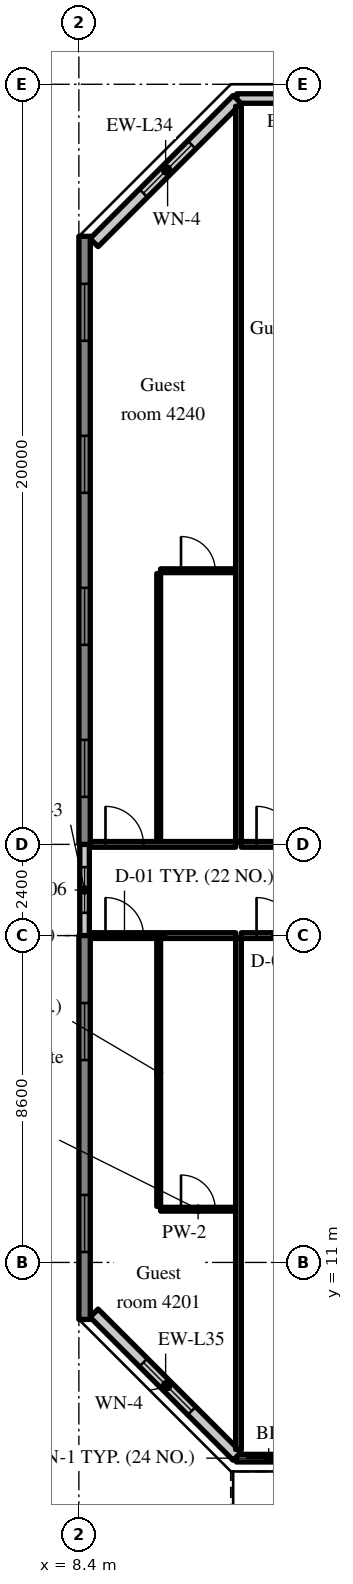
"""IFC4 building model, lengths in metres.
Left out: names, types, materials, properties, quantities, classifications, styles, units other than length and angle.
Written with IfcOpenShell. Run it as: python <this file> out.ifc"""

import sys

from ifc_helpers import new_model, si_unit, direction, frame, frame_2d, origin, place, context, subcontext, project, spatial, rectangle, extrude, source, transform, mapped, element, fill, save


model = new_model("IFC4")
c1 = context("Model", 3, precision=1e-05, world=origin(), true_north=direction((0.0, 1.0)))
c2 = subcontext(c1, "Body", "Model", "MODEL_VIEW")
j1 = project(units=[si_unit("LENGTHUNIT", "METRE"), si_unit("PLANEANGLEUNIT", "RADIAN")], contexts=[c1])
p1 = place(None, origin())
s1 = spatial("IfcSite", under=j1, at=p1, CompositionType="ELEMENT")
p2 = place(p1, origin())
s2 = spatial("IfcBuilding", under=s1, at=p2, CompositionType="ELEMENT")
p3 = place(p2, frame((0.0, 0.0, 174.4)))
s3 = spatial("IfcBuildingStorey", under=s2, at=p3, CompositionType="ELEMENT", Elevation=174.4)
m1 = source(origin(), c2, "Body", "SweptSolid", [
    extrude(rectangle(XDim=10.1, YDim=0.3, at=frame_2d((5.05, 0.0))), origin(), (0.0, 0.0, 1.0), 3.52),
])
p4 = place(p3, frame((8.55, 9.5, 0.0), z_axis=(0.0, 0.0, 1.0), x_axis=(0.0, 1.0, 0.0)))
e1 = element("IfcWall", 1, at=p4, inside=s3, PredefinedType="SHEAR", context=c2, shape_type="MappedRepresentation", body=[
    mapped(m1, transform((0.0, 0.0, 0.0), scale=1.0)),
])
m2 = source(origin(), c2, "Body", "SweptSolid", [
    extrude(rectangle(XDim=1.5, YDim=1.5, at=frame_2d((0.75, 0.75))), frame((0.0, 0.16, 0.0), z_axis=(0.0, -1.0, 0.0), x_axis=(1.0, 0.0, 0.0)), (0.0, 0.0, 1.0), 0.32),
])
p5 = place(p4, frame((1.775, 0.0, 0.9)))
e2 = element("IfcOpeningElement", 2, at=p5, cuts=e1, PredefinedType="OPENING", context=c2, shape_type="MappedRepresentation", body=[
    mapped(m2, transform((0.0, 0.0, 0.0), scale=1.0)),
])
p6 = place(p4, frame((6.825, 0.0, 0.9)))
e3 = element("IfcOpeningElement", 3, at=p6, cuts=e1, PredefinedType="OPENING", context=c2, shape_type="MappedRepresentation", body=[
    mapped(m2, transform((0.0, 0.0, 0.0), scale=1.0)),
])
m3 = source(origin(), c2, "Body", "SweptSolid", [
    extrude(rectangle(XDim=16.0, YDim=0.3, at=frame_2d((8.0, 0.0))), origin(), (0.0, 0.0, 1.0), 3.52),
])
p7 = place(p3, frame((8.55, 22.0, 0.0), z_axis=(0.0, 0.0, 1.0), x_axis=(0.0, 1.0, 0.0)))
e4 = element("IfcWall", 4, at=p7, inside=s3, PredefinedType="SHEAR", context=c2, shape_type="MappedRepresentation", body=[
    mapped(m3, transform((0.0, 0.0, 0.0), scale=1.0)),
])
p8 = place(p7, frame((1.25, 0.0, 0.9)))
e5 = element("IfcOpeningElement", 5, at=p8, cuts=e4, PredefinedType="OPENING", context=c2, shape_type="MappedRepresentation", body=[
    mapped(m2, transform((0.0, 0.0, 0.0), scale=1.0)),
])
p9 = place(p7, frame((5.25, 0.0, 0.9)))
e6 = element("IfcOpeningElement", 6, at=p9, cuts=e4, PredefinedType="OPENING", context=c2, shape_type="MappedRepresentation", body=[
    mapped(m2, transform((0.0, 0.0, 0.0), scale=1.0)),
])
p10 = place(p7, frame((9.25, 0.0, 0.9)))
e7 = element("IfcOpeningElement", 7, at=p10, cuts=e4, PredefinedType="OPENING", context=c2, shape_type="MappedRepresentation", body=[
    mapped(m2, transform((0.0, 0.0, 0.0), scale=1.0)),
])
p11 = place(p7, frame((13.25, 0.0, 0.9)))
e8 = element("IfcOpeningElement", 8, at=p11, cuts=e4, PredefinedType="OPENING", context=c2, shape_type="MappedRepresentation", body=[
    mapped(m2, transform((0.0, 0.0, 0.0), scale=1.0)),
])
m4 = source(origin(), c2, "Body", "SweptSolid", [
    extrude(rectangle(XDim=4.105, YDim=0.2, at=frame_2d((2.052, 0.0))), origin(), (0.0, 0.0, 1.0), 2.87),
])
p12 = place(p3, frame((12.545, 5.85, 0.0), z_axis=(0.0, 0.0, 1.0), x_axis=(1.0, 0.0, 0.0)))
e9 = element("IfcWall", 9, at=p12, inside=s3, PredefinedType="SOLIDWALL", context=c2, shape_type="MappedRepresentation", body=[
    mapped(m4, transform((0.0, 0.0, 0.0), scale=1.0)),
])
m5 = source(origin(), c2, "Body", "SweptSolid", [
    extrude(rectangle(XDim=1.2, YDim=2.4, at=frame_2d((0.6, 1.2))), frame((0.0, 0.11, 0.0), z_axis=(0.0, -1.0, 0.0), x_axis=(1.0, 0.0, 0.0)), (0.0, 0.0, 1.0), 0.22),
])
p13 = place(p12, frame((0.25, 0.0, 0.0)))
e10 = element("IfcOpeningElement", 10, at=p13, cuts=e9, PredefinedType="OPENING", context=c2, shape_type="MappedRepresentation", body=[
    mapped(m5, transform((0.0, 0.0, 0.0), scale=1.0)),
])
m6 = source(origin(), c2, "Body", "SweptSolid", [
    extrude(rectangle(XDim=1.5, YDim=1.5, at=frame_2d((0.75, 0.75))), frame((0.0, 0.11, 0.0), z_axis=(0.0, -1.0, 0.0), x_axis=(1.0, 0.0, 0.0)), (0.0, 0.0, 1.0), 0.22),
])
p14 = place(p12, frame((2.355, 0.0, 0.9)))
e11 = element("IfcOpeningElement", 11, at=p14, cuts=e9, PredefinedType="OPENING", context=c2, shape_type="MappedRepresentation", body=[
    mapped(m6, transform((0.0, 0.0, 0.0), scale=1.0)),
])
m7 = source(origin(), c2, "Body", "SweptSolid", [
    extrude(rectangle(XDim=4.094, YDim=0.25, at=frame_2d((2.047, 0.0))), origin(), (0.0, 0.0, 1.0), 2.87),
])
p15 = place(p3, frame((16.65, 41.625, 0.0), z_axis=(0.0, 0.0, 1.0), x_axis=(-1.0, 0.0, 0.0)))
e12 = element("IfcWall", 12, at=p15, inside=s3, PredefinedType="SOLIDWALL", context=c2, shape_type="MappedRepresentation", body=[
    mapped(m7, transform((0.0, 0.0, 0.0), scale=1.0)),
])
m8 = source(origin(), c2, "Body", "SweptSolid", [
    extrude(rectangle(XDim=1.5, YDim=1.5, at=frame_2d((0.75, 0.75))), frame((0.0, 0.135, 0.0), z_axis=(0.0, -1.0, 0.0), x_axis=(1.0, 0.0, 0.0)), (0.0, 0.0, 1.0), 0.27),
])
p16 = place(p15, frame((1.297, 0.0, 0.9)))
e13 = element("IfcOpeningElement", 13, at=p16, cuts=e12, PredefinedType="OPENING", context=c2, shape_type="MappedRepresentation", body=[
    mapped(m8, transform((0.0, 0.0, 0.0), scale=1.0)),
])
m9 = source(origin(), c2, "Body", "SweptSolid", [
    extrude(rectangle(XDim=5.326, YDim=0.3, at=frame_2d((2.663, 0.0))), origin(), (0.0, 0.0, 1.0), 3.52),
])
p17 = place(p3, frame((12.566, 41.6, 0.0), z_axis=(0.0, 0.0, 1.0), x_axis=(-0.707083859269, -0.707129702361, 0.0)))
e14 = element("IfcWall", 14, at=p17, inside=s3, PredefinedType="SOLIDWALL", context=c2, shape_type="MappedRepresentation", body=[
    mapped(m9, transform((0.0, 0.0, 0.0), scale=1.0)),
])
m10 = source(origin(), c2, "Body", "SweptSolid", [
    extrude(rectangle(XDim=1.8, YDim=1.5, at=frame_2d((0.9, 0.75))), frame((0.0, 0.16, 0.0), z_axis=(0.0, -1.0, 0.0), x_axis=(1.0, 0.0, 0.0)), (0.0, 0.0, 1.0), 0.32),
])
p18 = place(p17, frame((1.689, 0.0, 0.9)))
e15 = element("IfcOpeningElement", 15, at=p18, cuts=e14, PredefinedType="OPENING", context=c2, shape_type="MappedRepresentation", body=[
    mapped(m10, transform((0.0, 0.0, 0.0), scale=1.0)),
])
p19 = place(p3, frame((8.8, 9.666, 0.0), z_axis=(0.0, 0.0, 1.0), x_axis=(0.707083859269, -0.707129702361, 0.0)))
e16 = element("IfcWall", 16, at=p19, inside=s3, PredefinedType="SOLIDWALL", context=c2, shape_type="MappedRepresentation", body=[
    mapped(m9, transform((0.0, 0.0, 0.0), scale=1.0)),
])
p20 = place(p19, frame((1.836, 0.0, 0.9)))
e17 = element("IfcOpeningElement", 17, at=p20, cuts=e16, PredefinedType="OPENING", context=c2, shape_type="MappedRepresentation", body=[
    mapped(m10, transform((0.0, 0.0, 0.0), scale=1.0)),
])
m11 = source(origin(), c2, "Body", "SweptSolid", [
    extrude(rectangle(XDim=2.4, YDim=0.25, at=frame_2d((1.2, 0.0))), origin(), (0.0, 0.0, 1.0), 2.62),
])
p21 = place(p3, frame((8.55, 19.6, 0.0), z_axis=(0.0, 0.0, 1.0), x_axis=(0.0, 1.0, 0.0)))
e18 = element("IfcWall", 18, at=p21, inside=s3, PredefinedType="SOLIDWALL", context=c2, shape_type="MappedRepresentation", body=[
    mapped(m11, transform((0.0, 0.0, 0.0), scale=1.0)),
])
m12 = source(origin(), c2, "Body", "SweptSolid", [
    extrude(rectangle(XDim=1.2, YDim=1.5, at=frame_2d((0.6, 0.75))), frame((0.0, 0.135, 0.0), z_axis=(0.0, -1.0, 0.0), x_axis=(1.0, 0.0, 0.0)), (0.0, 0.0, 1.0), 0.27),
])
p22 = place(p21, frame((0.6, 0.0, 0.9)))
e19 = element("IfcOpeningElement", 19, at=p22, cuts=e18, PredefinedType="OPENING", context=c2, shape_type="MappedRepresentation", body=[
    mapped(m12, transform((0.0, 0.0, 0.0), scale=1.0)),
])
m13 = source(origin(), c2, "Body", "SweptSolid", [
    extrude(rectangle(XDim=7.05, YDim=0.1, at=frame_2d((3.525, 0.0))), origin(), (0.0, 0.0, 1.0), 3.52),
])
p23 = place(p3, frame((10.5, 12.475, 0.0), z_axis=(0.0, 0.0, 1.0), x_axis=(0.0, 1.0, 0.0)))
e20 = element("IfcWall", 20, at=p23, inside=s3, PredefinedType="PARTITIONING", context=c2, shape_type="MappedRepresentation", body=[
    mapped(m13, transform((0.0, 0.0, 0.0), scale=1.0)),
])
m14 = source(origin(), c2, "Body", "SweptSolid", [
    extrude(rectangle(XDim=1.975, YDim=0.1, at=frame_2d((0.987, 0.0))), origin(), (0.0, 0.0, 1.0), 3.52),
])
p24 = place(p3, frame((10.55, 12.4, 0.0), z_axis=(0.0, 0.0, 1.0), x_axis=(1.0, 0.0, 0.0)))
e21 = element("IfcWall", 21, at=p24, inside=s3, PredefinedType="PARTITIONING", context=c2, shape_type="MappedRepresentation", body=[
    mapped(m14, transform((0.0, 0.0, 0.0), scale=1.0)),
])
m15 = source(origin(), c2, "Body", "SweptSolid", [
    extrude(rectangle(XDim=0.9, YDim=2.1, at=frame_2d((0.45, 1.05))), frame((0.0, 0.06, 0.0), z_axis=(0.0, -1.0, 0.0), x_axis=(1.0, 0.0, 0.0)), (0.0, 0.0, 1.0), 0.12),
])
p25 = place(p24, frame((0.538, 0.0, 0.0)))
e22 = element("IfcOpeningElement", 22, at=p25, cuts=e21, PredefinedType="OPENING", context=c2, shape_type="MappedRepresentation", body=[
    mapped(m15, transform((0.0, 0.0, 0.0), scale=1.0)),
])
m16 = source(origin(), c2, "Body", "SweptSolid", [
    extrude(rectangle(XDim=3.825, YDim=0.15, at=frame_2d((1.913, 0.0))), origin(), (0.0, 0.0, 1.0), 2.82),
])
p26 = place(p3, frame((8.7, 19.6, 0.0), z_axis=(0.0, 0.0, 1.0), x_axis=(1.0, 0.0, 0.0)))
e23 = element("IfcWall", 23, at=p26, inside=s3, PredefinedType="PARTITIONING", context=c2, shape_type="MappedRepresentation", body=[
    mapped(m16, transform((0.0, 0.0, 0.0), scale=1.0)),
])
m17 = source(origin(), c2, "Body", "SweptSolid", [
    extrude(rectangle(XDim=1.0, YDim=2.1, at=frame_2d((0.5, 1.05))), frame((0.0, 0.085, 0.0), z_axis=(0.0, -1.0, 0.0), x_axis=(1.0, 0.0, 0.0)), (0.0, 0.0, 1.0), 0.17),
])
p27 = place(p26, frame((0.4, 0.0, 0.0)))
e24 = element("IfcOpeningElement", 24, at=p27, cuts=e23, PredefinedType="OPENING", context=c2, shape_type="MappedRepresentation", body=[
    mapped(m17, transform((0.0, 0.0, 0.0), scale=1.0)),
])
m18 = source(origin(), c2, "Body", "SweptSolid", [
    extrude(rectangle(XDim=3.975, YDim=0.15, at=frame_2d((1.987, 0.0))), origin(), (0.0, 0.0, 1.0), 2.82),
])
p28 = place(p3, frame((12.675, 19.6, 0.0), z_axis=(0.0, 0.0, 1.0), x_axis=(1.0, 0.0, 0.0)))
e25 = element("IfcWall", 25, at=p28, inside=s3, PredefinedType="PARTITIONING", context=c2, shape_type="MappedRepresentation", body=[
    mapped(m18, transform((0.0, 0.0, 0.0), scale=1.0)),
])
p29 = place(p28, frame((0.4, 0.0, 0.0)))
e26 = element("IfcOpeningElement", 26, at=p29, cuts=e25, PredefinedType="OPENING", context=c2, shape_type="MappedRepresentation", body=[
    mapped(m17, transform((0.0, 0.0, 0.0), scale=1.0)),
])
m19 = source(origin(), c2, "Body", "SweptSolid", [
    extrude(rectangle(XDim=13.447, YDim=0.15, at=frame_2d((6.724, 0.0))), origin(), (0.0, 0.0, 1.0), 3.52),
])
p30 = place(p3, frame((12.6, 6.078, 0.0), z_axis=(0.0, 0.0, 1.0), x_axis=(0.0, 1.0, 0.0)))
e27 = element("IfcWall", 27, at=p30, inside=s3, PredefinedType="PARTITIONING", context=c2, shape_type="MappedRepresentation", body=[
    mapped(m19, transform((0.0, 0.0, 0.0), scale=1.0)),
])
m20 = source(origin(), c2, "Body", "SweptSolid", [
    extrude(rectangle(XDim=7.05, YDim=0.1, at=frame_2d((3.525, 0.0))), origin(), (0.0, 0.0, 1.0), 3.52),
])
p31 = place(p3, frame((10.5, 22.075, 0.0), z_axis=(0.0, 0.0, 1.0), x_axis=(0.0, 1.0, 0.0)))
e28 = element("IfcWall", 28, at=p31, inside=s3, PredefinedType="PARTITIONING", context=c2, shape_type="MappedRepresentation", body=[
    mapped(m20, transform((0.0, 0.0, 0.0), scale=1.0)),
])
p32 = place(p3, frame((10.55, 29.2, 0.0), z_axis=(0.0, 0.0, 1.0), x_axis=(1.0, 0.0, 0.0)))
e29 = element("IfcWall", 29, at=p32, inside=s3, PredefinedType="PARTITIONING", context=c2, shape_type="MappedRepresentation", body=[
    mapped(m14, transform((0.0, 0.0, 0.0), scale=1.0)),
])
p33 = place(p32, frame((0.538, 0.0, 0.0)))
e30 = element("IfcOpeningElement", 30, at=p33, cuts=e29, PredefinedType="OPENING", context=c2, shape_type="MappedRepresentation", body=[
    mapped(m15, transform((0.0, 0.0, 0.0), scale=1.0)),
])
p34 = place(p3, frame((8.7, 22.0, 0.0), z_axis=(0.0, 0.0, 1.0), x_axis=(1.0, 0.0, 0.0)))
e31 = element("IfcWall", 31, at=p34, inside=s3, PredefinedType="PARTITIONING", context=c2, shape_type="MappedRepresentation", body=[
    mapped(m16, transform((0.0, 0.0, 0.0), scale=1.0)),
])
p35 = place(p34, frame((0.4, 0.0, 0.0)))
e32 = element("IfcOpeningElement", 32, at=p35, cuts=e31, PredefinedType="OPENING", context=c2, shape_type="MappedRepresentation", body=[
    mapped(m17, transform((0.0, 0.0, 0.0), scale=1.0)),
])
p36 = place(p3, frame((12.675, 22.0, 0.0), z_axis=(0.0, 0.0, 1.0), x_axis=(1.0, 0.0, 0.0)))
e33 = element("IfcWall", 33, at=p36, inside=s3, PredefinedType="PARTITIONING", context=c2, shape_type="MappedRepresentation", body=[
    mapped(m18, transform((0.0, 0.0, 0.0), scale=1.0)),
])
p37 = place(p36, frame((0.4, 0.0, 0.0)))
e34 = element("IfcOpeningElement", 34, at=p37, cuts=e33, PredefinedType="OPENING", context=c2, shape_type="MappedRepresentation", body=[
    mapped(m17, transform((0.0, 0.0, 0.0), scale=1.0)),
])
m21 = source(origin(), c2, "Body", "SweptSolid", [
    extrude(rectangle(XDim=19.347, YDim=0.15, at=frame_2d((9.674, 0.0))), origin(), (0.0, 0.0, 1.0), 3.52),
])
p38 = place(p3, frame((12.6, 22.075, 0.0), z_axis=(0.0, 0.0, 1.0), x_axis=(0.0, 1.0, 0.0)))
e35 = element("IfcWall", 35, at=p38, inside=s3, PredefinedType="PARTITIONING", context=c2, shape_type="MappedRepresentation", body=[
    mapped(m21, transform((0.0, 0.0, 0.0), scale=1.0)),
])
m22 = source(origin(), c2, "Body", "SweptSolid", [
    extrude(rectangle(XDim=1.2, YDim=2.4, at=frame_2d((0.6, 1.2))), frame((0.0, 0.025, 0.0), z_axis=(0.0, -1.0, 0.0), x_axis=(1.0, 0.0, 0.0)), (0.0, 0.0, 1.0), 0.05),
])
p39 = place(p13, origin())
e36 = element("IfcDoor", 36, at=p39, inside=s3, OperationType="SLIDING_TO_LEFT", PredefinedType="DOOR", context=c2, shape_type="MappedRepresentation", body=[
    mapped(m22, transform((0.0, 0.0, 0.0), scale=1.0)),
])
fill(e10, e36)
m23 = source(origin(), c2, "Body", "SweptSolid", [
    extrude(rectangle(XDim=1.8, YDim=1.5, at=frame_2d((0.9, 0.75))), frame((0.0, 0.03, 0.0), z_axis=(0.0, -1.0, 0.0), x_axis=(1.0, 0.0, 0.0)), (0.0, 0.0, 1.0), 0.06),
])
p40 = place(p18, origin())
e37 = element("IfcWindow", 37, at=p40, inside=s3, PartitioningType="SINGLE_PANEL", PredefinedType="WINDOW", context=c2, shape_type="MappedRepresentation", body=[
    mapped(m23, transform((0.0, 0.0, 0.0), scale=1.0)),
])
fill(e15, e37)
p41 = place(p20, origin())
e38 = element("IfcWindow", 38, at=p41, inside=s3, PartitioningType="SINGLE_PANEL", PredefinedType="WINDOW", context=c2, shape_type="MappedRepresentation", body=[
    mapped(m23, transform((0.0, 0.0, 0.0), scale=1.0)),
])
fill(e17, e38)
m24 = source(origin(), c2, "Body", "SweptSolid", [
    extrude(rectangle(XDim=1.5, YDim=1.5, at=frame_2d((0.75, 0.75))), frame((0.0, 0.03, 0.0), z_axis=(0.0, -1.0, 0.0), x_axis=(1.0, 0.0, 0.0)), (0.0, 0.0, 1.0), 0.06),
])
p42 = place(p5, origin())
e39 = element("IfcWindow", 39, at=p42, inside=s3, PartitioningType="SINGLE_PANEL", PredefinedType="WINDOW", context=c2, shape_type="MappedRepresentation", body=[
    mapped(m24, transform((0.0, 0.0, 0.0), scale=1.0)),
])
fill(e2, e39)
p43 = place(p6, origin())
e40 = element("IfcWindow", 40, at=p43, inside=s3, PartitioningType="SINGLE_PANEL", PredefinedType="WINDOW", context=c2, shape_type="MappedRepresentation", body=[
    mapped(m24, transform((0.0, 0.0, 0.0), scale=1.0)),
])
fill(e3, e40)
p44 = place(p8, origin())
e41 = element("IfcWindow", 41, at=p44, inside=s3, PartitioningType="SINGLE_PANEL", PredefinedType="WINDOW", context=c2, shape_type="MappedRepresentation", body=[
    mapped(m24, transform((0.0, 0.0, 0.0), scale=1.0)),
])
fill(e5, e41)
p45 = place(p9, origin())
e42 = element("IfcWindow", 42, at=p45, inside=s3, PartitioningType="SINGLE_PANEL", PredefinedType="WINDOW", context=c2, shape_type="MappedRepresentation", body=[
    mapped(m24, transform((0.0, 0.0, 0.0), scale=1.0)),
])
fill(e6, e42)
p46 = place(p10, origin())
e43 = element("IfcWindow", 43, at=p46, inside=s3, PartitioningType="SINGLE_PANEL", PredefinedType="WINDOW", context=c2, shape_type="MappedRepresentation", body=[
    mapped(m24, transform((0.0, 0.0, 0.0), scale=1.0)),
])
fill(e7, e43)
p47 = place(p11, origin())
e44 = element("IfcWindow", 44, at=p47, inside=s3, PartitioningType="SINGLE_PANEL", PredefinedType="WINDOW", context=c2, shape_type="MappedRepresentation", body=[
    mapped(m24, transform((0.0, 0.0, 0.0), scale=1.0)),
])
fill(e8, e44)
m25 = source(origin(), c2, "Body", "SweptSolid", [
    extrude(rectangle(XDim=1.2, YDim=1.5, at=frame_2d((0.6, 0.75))), frame((0.0, 0.03, 0.0), z_axis=(0.0, -1.0, 0.0), x_axis=(1.0, 0.0, 0.0)), (0.0, 0.0, 1.0), 0.06),
])
p48 = place(p22, origin())
e45 = element("IfcWindow", 45, at=p48, inside=s3, PartitioningType="SINGLE_PANEL", PredefinedType="WINDOW", context=c2, shape_type="MappedRepresentation", body=[
    mapped(m25, transform((0.0, 0.0, 0.0), scale=1.0)),
])
fill(e19, e45)
m26 = source(origin(), c2, "Body", "SweptSolid", [
    extrude(rectangle(XDim=0.9, YDim=2.1, at=frame_2d((0.45, 1.05))), frame((0.0, 0.025, 0.0), z_axis=(0.0, -1.0, 0.0), x_axis=(1.0, 0.0, 0.0)), (0.0, 0.0, 1.0), 0.05),
])
p49 = place(p25, origin())
e46 = element("IfcDoor", 46, at=p49, inside=s3, OperationType="SINGLE_SWING_LEFT", PredefinedType="DOOR", context=c2, shape_type="MappedRepresentation", body=[
    mapped(m26, transform((0.0, 0.0, 0.0), scale=1.0)),
])
fill(e22, e46)
m27 = source(origin(), c2, "Body", "SweptSolid", [
    extrude(rectangle(XDim=1.0, YDim=2.1, at=frame_2d((0.5, 1.05))), frame((0.0, 0.025, 0.0), z_axis=(0.0, -1.0, 0.0), x_axis=(1.0, 0.0, 0.0)), (0.0, 0.0, 1.0), 0.05),
])
p50 = place(p27, origin())
e47 = element("IfcDoor", 47, at=p50, inside=s3, OperationType="SINGLE_SWING_LEFT", PredefinedType="DOOR", context=c2, shape_type="MappedRepresentation", body=[
    mapped(m27, transform((0.0, 0.0, 0.0), scale=1.0)),
])
fill(e24, e47)
p51 = place(p29, origin())
e48 = element("IfcDoor", 48, at=p51, inside=s3, OperationType="SINGLE_SWING_LEFT", PredefinedType="DOOR", context=c2, shape_type="MappedRepresentation", body=[
    mapped(m27, transform((0.0, 0.0, 0.0), scale=1.0)),
])
fill(e26, e48)
p52 = place(p33, origin())
e49 = element("IfcDoor", 49, at=p52, inside=s3, OperationType="SINGLE_SWING_LEFT", PredefinedType="DOOR", context=c2, shape_type="MappedRepresentation", body=[
    mapped(m26, transform((0.0, 0.0, 0.0), scale=1.0)),
])
fill(e30, e49)
p53 = place(p35, origin())
e50 = element("IfcDoor", 50, at=p53, inside=s3, OperationType="SINGLE_SWING_LEFT", PredefinedType="DOOR", context=c2, shape_type="MappedRepresentation", body=[
    mapped(m27, transform((0.0, 0.0, 0.0), scale=1.0)),
])
fill(e32, e50)
p54 = place(p37, origin())
e51 = element("IfcDoor", 51, at=p54, inside=s3, OperationType="SINGLE_SWING_LEFT", PredefinedType="DOOR", context=c2, shape_type="MappedRepresentation", body=[
    mapped(m27, transform((0.0, 0.0, 0.0), scale=1.0)),
])
fill(e34, e51)
save(model, sys.argv[1])
